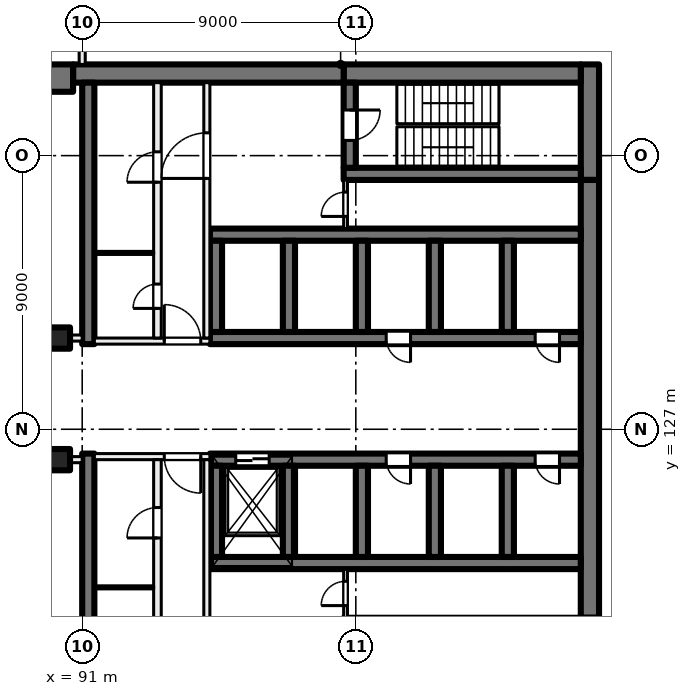
"""IFC4 building model, lengths in metres.
Left out: names, types, materials, properties, quantities, classifications, styles, units other than length and angle.
Written with IfcOpenShell. Run it as: python <this file> out.ifc"""

import sys

from ifc_helpers import new_model, si_unit, direction, frame, frame_2d, origin, origin_2d, place, context, subcontext, project, spatial, rectangle, extrude, element, fill, save


model = new_model("IFC4")
c1 = context("Model", 3, precision=1e-05, world=origin(), true_north=direction((0.0, 1.0)))
c2 = subcontext(c1, "Body", "Model", "MODEL_VIEW")
j1 = project(units=[si_unit("LENGTHUNIT", "METRE"), si_unit("PLANEANGLEUNIT", "RADIAN")], contexts=[c1])
p1 = place(None, origin())
s1 = spatial("IfcSite", under=j1, at=p1, CompositionType="ELEMENT")
p2 = place(p1, origin())
s2 = spatial("IfcBuilding", under=s1, at=p2, CompositionType="ELEMENT")
p3 = place(p2, frame((0.0, 0.0, -9.0)))
s3 = spatial("IfcBuildingStorey", under=s2, at=p3, CompositionType="ELEMENT", Elevation=-9.0)
for number, where, z_axis, x_axis in (
    (1, (90.25, 130.0, 0.0), (0.0, 0.0, 1.0), (1.0, 0.0, 0.0)),
    (2, (90.25, 126.0, 0.0), (0.0, 0.0, 1.0), (1.0, 0.0, 0.0)),
):
    element("IfcColumn", number, at=place(p3, frame(where, z_axis=z_axis, x_axis=x_axis)), inside=s3, PredefinedType="COLUMN", context=c2, shape_type="SweptSolid", body=[
        extrude(rectangle(XDim=0.7, YDim=0.7, at=origin_2d()), origin(), (0.0, 0.0, 1.0), 4.5),
    ])
p4 = place(p3, frame((90.25, 138.55, 0.0), z_axis=(0.0, 0.0, 1.0), x_axis=(1.0, 0.0, 0.0)))
e3 = element("IfcColumn", 3, at=p4, inside=s3, PredefinedType="COLUMN", context=c2, shape_type="SweptSolid", body=[
    extrude(rectangle(XDim=0.9, YDim=0.9, at=origin_2d()), origin(), (0.0, 0.0, 1.0), 4.5),
])
p5 = place(p3, frame((107.7, 139.0, 0.0), z_axis=(0.0, 0.0, 1.0), x_axis=(0.0, -1.0, 0.0)))
e4 = element("IfcWall", 4, at=p5, inside=s3, PredefinedType="SHEAR", context=c2, shape_type="SweptSolid", body=[
    extrude(rectangle(XDim=3.8, YDim=0.6, at=frame_2d((1.9, 0.0))), origin(), (0.0, 0.0, 1.0), 4.5),
])
p6 = place(p3, frame((107.7, 135.2, 0.0), z_axis=(0.0, 0.0, 1.0), x_axis=(0.0, -1.0, 0.0)))
e5 = element("IfcWall", 5, at=p6, inside=s3, PredefinedType="SHEAR", context=c2, shape_type="SweptSolid", body=[
    extrude(rectangle(XDim=14.4, YDim=0.6, at=frame_2d((7.2, 0.0))), origin(), (0.0, 0.0, 1.0), 4.5),
])
p7 = place(p3, frame((107.4, 138.7, 0.0), z_axis=(0.0, 0.0, 1.0), x_axis=(-1.0, 0.0, 0.0)))
e6 = element("IfcWall", 6, at=p7, inside=s3, PredefinedType="SHEAR", context=c2, shape_type="SweptSolid", body=[
    extrude(rectangle(XDim=7.8, YDim=0.6, at=frame_2d((3.9, 0.0))), origin(), (0.0, 0.0, 1.0), 4.5),
])
p8 = place(p3, frame((99.6, 138.7, 0.0), z_axis=(0.0, 0.0, 1.0), x_axis=(-1.0, 0.0, 0.0)))
e7 = element("IfcWall", 7, at=p8, inside=s3, PredefinedType="SHEAR", context=c2, shape_type="SweptSolid", body=[
    extrude(rectangle(XDim=8.9, YDim=0.6, at=frame_2d((4.45, 0.0))), origin(), (0.0, 0.0, 1.0), 4.5),
])
p9 = place(p3, frame((107.4, 135.4, 0.0), z_axis=(0.0, 0.0, 1.0), x_axis=(-1.0, 0.0, 0.0)))
e8 = element("IfcWall", 8, at=p9, inside=s3, PredefinedType="SHEAR", context=c2, shape_type="SweptSolid", body=[
    extrude(rectangle(XDim=7.8, YDim=0.4, at=frame_2d((3.9, 0.0))), origin(), (0.0, 0.0, 1.0), 4.5),
])
p10 = place(p3, frame((99.8, 138.4, 0.0), z_axis=(0.0, 0.0, 1.0), x_axis=(0.0, -1.0, 0.0)))
e9 = element("IfcWall", 9, at=p10, inside=s3, PredefinedType="SHEAR", context=c2, shape_type="SweptSolid", body=[
    extrude(rectangle(XDim=2.8, YDim=0.4, at=frame_2d((1.4, 0.0))), origin(), (0.0, 0.0, 1.0), 4.5),
])
p11 = place(p10, frame((0.9, 0.0, 0.0)))
e10 = element("IfcOpeningElement", 10, at=p11, cuts=e9, PredefinedType="OPENING", context=c2, shape_type="SweptSolid", body=[
    extrude(rectangle(XDim=1.0, YDim=2.1, at=frame_2d((0.5, 1.05))), frame((0.0, 0.21, 0.0), z_axis=(0.0, -1.0, 0.0), x_axis=(1.0, 0.0, 0.0)), (0.0, 0.0, 1.0), 0.42),
])
p12 = place(p3, frame((107.4, 130.0, 0.0), z_axis=(0.0, 0.0, 1.0), x_axis=(-1.0, 0.0, 0.0)))
e11 = element("IfcWall", 11, at=p12, inside=s3, PredefinedType="SHEAR", context=c2, shape_type="SweptSolid", body=[
    extrude(rectangle(XDim=12.2, YDim=0.4, at=frame_2d((6.1, 0.0))), origin(), (0.0, 0.0, 1.0), 4.5),
])
p13 = place(p12, frame((0.7, 0.0, 0.0)))
e12 = element("IfcOpeningElement", 12, at=p13, cuts=e11, PredefinedType="OPENING", context=c2, shape_type="SweptSolid", body=[
    extrude(rectangle(XDim=0.8, YDim=2.1, at=frame_2d((0.4, 1.05))), frame((0.0, 0.21, 0.0), z_axis=(0.0, -1.0, 0.0), x_axis=(1.0, 0.0, 0.0)), (0.0, 0.0, 1.0), 0.42),
])
p14 = place(p12, frame((5.6, 0.0, 0.0)))
e13 = element("IfcOpeningElement", 13, at=p14, cuts=e11, PredefinedType="OPENING", context=c2, shape_type="SweptSolid", body=[
    extrude(rectangle(XDim=0.8, YDim=2.1, at=frame_2d((0.4, 1.05))), frame((0.0, 0.21, 0.0), z_axis=(0.0, -1.0, 0.0), x_axis=(1.0, 0.0, 0.0)), (0.0, 0.0, 1.0), 0.42),
])
p15 = place(p3, frame((107.4, 133.4, 0.0), z_axis=(0.0, 0.0, 1.0), x_axis=(-1.0, 0.0, 0.0)))
e14 = element("IfcWall", 14, at=p15, inside=s3, PredefinedType="SHEAR", context=c2, shape_type="SweptSolid", body=[
    extrude(rectangle(XDim=12.2, YDim=0.4, at=frame_2d((6.1, 0.0))), origin(), (0.0, 0.0, 1.0), 4.5),
])
for number, where, z_axis, x_axis in (
    (15, (105.0, 133.2, 0.0), (0.0, 0.0, 1.0), (0.0, -1.0, 0.0)),
    (16, (102.6, 133.2, 0.0), (0.0, 0.0, 1.0), (0.0, -1.0, 0.0)),
    (17, (100.2, 133.2, 0.0), (0.0, 0.0, 1.0), (0.0, -1.0, 0.0)),
    (18, (97.8, 133.2, 0.0), (0.0, 0.0, 1.0), (0.0, -1.0, 0.0)),
    (19, (95.4, 133.2, 0.0), (0.0, 0.0, 1.0), (0.0, -1.0, 0.0)),
):
    element("IfcWall", number, at=place(p3, frame(where, z_axis=z_axis, x_axis=x_axis)), inside=s3, PredefinedType="SHEAR", context=c2, shape_type="SweptSolid", body=[
        extrude(rectangle(XDim=3.0, YDim=0.4, at=frame_2d((1.5, 0.0))), origin(), (0.0, 0.0, 1.0), 4.5),
    ])
p16 = place(p3, frame((107.4, 126.0, 0.0), z_axis=(0.0, 0.0, 1.0), x_axis=(-1.0, 0.0, 0.0)))
e20 = element("IfcWall", 20, at=p16, inside=s3, PredefinedType="SHEAR", context=c2, shape_type="SweptSolid", body=[
    extrude(rectangle(XDim=12.2, YDim=0.4, at=frame_2d((6.1, 0.0))), origin(), (0.0, 0.0, 1.0), 4.5),
])
p17 = place(p16, frame((10.25, 0.0, 0.0)))
e21 = element("IfcOpeningElement", 21, at=p17, cuts=e20, PredefinedType="OPENING", context=c2, shape_type="SweptSolid", body=[
    extrude(rectangle(XDim=1.1, YDim=2.1, at=frame_2d((0.55, 1.05))), frame((0.0, 0.21, 0.0), z_axis=(0.0, -1.0, 0.0), x_axis=(1.0, 0.0, 0.0)), (0.0, 0.0, 1.0), 0.42),
])
p18 = place(p16, frame((0.7, 0.0, 0.0)))
e22 = element("IfcOpeningElement", 22, at=p18, cuts=e20, PredefinedType="OPENING", context=c2, shape_type="SweptSolid", body=[
    extrude(rectangle(XDim=0.8, YDim=2.1, at=frame_2d((0.4, 1.05))), frame((0.0, 0.21, 0.0), z_axis=(0.0, -1.0, 0.0), x_axis=(1.0, 0.0, 0.0)), (0.0, 0.0, 1.0), 0.42),
])
p19 = place(p16, frame((5.6, 0.0, 0.0)))
e23 = element("IfcOpeningElement", 23, at=p19, cuts=e20, PredefinedType="OPENING", context=c2, shape_type="SweptSolid", body=[
    extrude(rectangle(XDim=0.8, YDim=2.1, at=frame_2d((0.4, 1.05))), frame((0.0, 0.21, 0.0), z_axis=(0.0, -1.0, 0.0), x_axis=(1.0, 0.0, 0.0)), (0.0, 0.0, 1.0), 0.42),
])
p20 = place(p3, frame((107.4, 122.6, 0.0), z_axis=(0.0, 0.0, 1.0), x_axis=(-1.0, 0.0, 0.0)))
e24 = element("IfcWall", 24, at=p20, inside=s3, PredefinedType="SHEAR", context=c2, shape_type="SweptSolid", body=[
    extrude(rectangle(XDim=12.2, YDim=0.4, at=frame_2d((6.1, 0.0))), origin(), (0.0, 0.0, 1.0), 4.5),
])
for number, where, z_axis, x_axis in (
    (25, (105.0, 125.8, 0.0), (0.0, 0.0, 1.0), (0.0, -1.0, 0.0)),
    (26, (102.6, 125.8, 0.0), (0.0, 0.0, 1.0), (0.0, -1.0, 0.0)),
    (27, (100.2, 125.8, 0.0), (0.0, 0.0, 1.0), (0.0, -1.0, 0.0)),
    (28, (97.8, 125.8, 0.0), (0.0, 0.0, 1.0), (0.0, -1.0, 0.0)),
    (29, (95.4, 125.8, 0.0), (0.0, 0.0, 1.0), (0.0, -1.0, 0.0)),
):
    element("IfcWall", number, at=place(p3, frame(where, z_axis=z_axis, x_axis=x_axis)), inside=s3, PredefinedType="SHEAR", context=c2, shape_type="SweptSolid", body=[
        extrude(rectangle(XDim=3.0, YDim=0.4, at=frame_2d((1.5, 0.0))), origin(), (0.0, 0.0, 1.0), 4.5),
    ])
for number, where, z_axis, x_axis in (
    (30, (91.2, 138.4, 0.0), (0.0, 0.0, 1.0), (0.0, -1.0, 0.0)),
    (31, (91.2, 126.2, 0.0), (0.0, 0.0, 1.0), (0.0, -1.0, 0.0)),
):
    element("IfcWall", number, at=place(p3, frame(where, z_axis=z_axis, x_axis=x_axis)), inside=s3, PredefinedType="SHEAR", context=c2, shape_type="SweptSolid", body=[
        extrude(rectangle(XDim=8.6, YDim=0.4, at=frame_2d((4.3, 0.0))), origin(), (0.0, 0.0, 1.0), 4.5),
    ])
p21 = place(p3, frame((95.2, 126.1, 0.0), z_axis=(0.0, 0.0, 1.0), x_axis=(-1.0, 0.0, 0.0)))
e32 = element("IfcWall", 32, at=p21, inside=s3, PredefinedType="PARTITIONING", context=c2, shape_type="SweptSolid", body=[
    extrude(rectangle(XDim=3.8, YDim=0.2, at=frame_2d((1.9, 0.0))), origin(), (0.0, 0.0, 1.0), 4.125),
])
p22 = place(p21, frame((0.3, 0.0, 0.0)))
e33 = element("IfcOpeningElement", 33, at=p22, cuts=e32, PredefinedType="OPENING", context=c2, shape_type="SweptSolid", body=[
    extrude(rectangle(XDim=1.2, YDim=2.1, at=frame_2d((0.6, 1.05))), frame((0.0, 0.11, 0.0), z_axis=(0.0, -1.0, 0.0), x_axis=(1.0, 0.0, 0.0)), (0.0, 0.0, 1.0), 0.22),
])
p23 = place(p3, frame((95.1, 117.6, 0.0), z_axis=(0.0, 0.0, 1.0), x_axis=(0.0, 1.0, 0.0)))
e34 = element("IfcWall", 34, at=p23, inside=s3, PredefinedType="PARTITIONING", context=c2, shape_type="SweptSolid", body=[
    extrude(rectangle(XDim=8.4, YDim=0.2, at=frame_2d((4.2, 0.0))), origin(), (0.0, 0.0, 1.0), 4.125),
])
p24 = place(p23, frame((1.65, 0.0, 0.0)))
e35 = element("IfcOpeningElement", 35, at=p24, cuts=e34, PredefinedType="OPENING", context=c2, shape_type="SweptSolid", body=[
    extrude(rectangle(XDim=1.5, YDim=2.1, at=frame_2d((0.75, 1.05))), frame((0.0, 0.11, 0.0), z_axis=(0.0, -1.0, 0.0), x_axis=(1.0, 0.0, 0.0)), (0.0, 0.0, 1.0), 0.22),
])
p25 = place(p3, frame((93.475, 117.6, 0.0), z_axis=(0.0, 0.0, 1.0), x_axis=(0.0, 1.0, 0.0)))
e36 = element("IfcWall", 36, at=p25, inside=s3, PredefinedType="PARTITIONING", context=c2, shape_type="SweptSolid", body=[
    extrude(rectangle(XDim=8.4, YDim=0.25, at=frame_2d((4.2, 0.0))), origin(), (0.0, 0.0, 1.0), 4.125),
])
p26 = place(p25, frame((5.825, 0.0, 0.0)))
e37 = element("IfcOpeningElement", 37, at=p26, cuts=e36, PredefinedType="OPENING", context=c2, shape_type="SweptSolid", body=[
    extrude(rectangle(XDim=1.0, YDim=2.1, at=frame_2d((0.5, 1.05))), frame((0.0, 0.135, 0.0), z_axis=(0.0, -1.0, 0.0), x_axis=(1.0, 0.0, 0.0)), (0.0, 0.0, 1.0), 0.27),
])
p27 = place(p25, frame((1.675, 0.0, 0.0)))
e38 = element("IfcOpeningElement", 38, at=p27, cuts=e36, PredefinedType="OPENING", context=c2, shape_type="SweptSolid", body=[
    extrude(rectangle(XDim=0.8, YDim=2.1, at=frame_2d((0.4, 1.05))), frame((0.0, 0.135, 0.0), z_axis=(0.0, -1.0, 0.0), x_axis=(1.0, 0.0, 0.0)), (0.0, 0.0, 1.0), 0.27),
])
p28 = place(p3, frame((99.663, 120.8, 0.0), z_axis=(0.0, 0.0, 1.0), x_axis=(0.0, 1.0, 0.0)))
e39 = element("IfcWall", 39, at=p28, inside=s3, PredefinedType="PARTITIONING", context=c2, shape_type="SweptSolid", body=[
    extrude(rectangle(XDim=1.6, YDim=0.125, at=frame_2d((0.8, 0.0))), origin(), (0.0, 0.0, 1.0), 4.125),
])
p29 = place(p28, frame((0.4, 0.0, 0.0)))
e40 = element("IfcOpeningElement", 40, at=p29, cuts=e39, PredefinedType="OPENING", context=c2, shape_type="SweptSolid", body=[
    extrude(rectangle(XDim=0.8, YDim=2.1, at=frame_2d((0.4, 1.05))), frame((0.0, 0.073, 0.0), z_axis=(0.0, -1.0, 0.0), x_axis=(1.0, 0.0, 0.0)), (0.0, 0.0, 1.0), 0.145),
])
p30 = place(p3, frame((93.35, 121.8, 0.0), z_axis=(0.0, 0.0, 1.0), x_axis=(-1.0, 0.0, 0.0)))
e41 = element("IfcWall", 41, at=p30, inside=s3, PredefinedType="PARTITIONING", context=c2, shape_type="SweptSolid", body=[
    extrude(rectangle(XDim=1.95, YDim=0.1, at=frame_2d((0.975, 0.0))), origin(), (0.0, 0.0, 1.0), 4.125),
])
p31 = place(p3, frame((91.4, 129.9, 0.0), z_axis=(0.0, 0.0, 1.0), x_axis=(1.0, 0.0, 0.0)))
e42 = element("IfcWall", 42, at=p31, inside=s3, PredefinedType="PARTITIONING", context=c2, shape_type="SweptSolid", body=[
    extrude(rectangle(XDim=3.8, YDim=0.2, at=frame_2d((1.9, 0.0))), origin(), (0.0, 0.0, 1.0), 4.125),
])
p32 = place(p31, frame((2.3, 0.0, 0.0)))
e43 = element("IfcOpeningElement", 43, at=p32, cuts=e42, PredefinedType="OPENING", context=c2, shape_type="SweptSolid", body=[
    extrude(rectangle(XDim=1.2, YDim=2.1, at=frame_2d((0.6, 1.05))), frame((0.0, 0.11, 0.0), z_axis=(0.0, -1.0, 0.0), x_axis=(1.0, 0.0, 0.0)), (0.0, 0.0, 1.0), 0.22),
])
p33 = place(p3, frame((95.1, 130.0, 0.0), z_axis=(0.0, 0.0, 1.0), x_axis=(0.0, 1.0, 0.0)))
e44 = element("IfcWall", 44, at=p33, inside=s3, PredefinedType="PARTITIONING", context=c2, shape_type="SweptSolid", body=[
    extrude(rectangle(XDim=8.4, YDim=0.2, at=frame_2d((4.2, 0.0))), origin(), (0.0, 0.0, 1.0), 4.125),
])
p34 = place(p33, frame((5.25, 0.0, 0.0)))
e45 = element("IfcOpeningElement", 45, at=p34, cuts=e44, PredefinedType="OPENING", context=c2, shape_type="SweptSolid", body=[
    extrude(rectangle(XDim=1.5, YDim=2.1, at=frame_2d((0.75, 1.05))), frame((0.0, 0.11, 0.0), z_axis=(0.0, -1.0, 0.0), x_axis=(1.0, 0.0, 0.0)), (0.0, 0.0, 1.0), 0.22),
])
p35 = place(p3, frame((93.475, 130.0, 0.0), z_axis=(0.0, 0.0, 1.0), x_axis=(0.0, 1.0, 0.0)))
e46 = element("IfcWall", 46, at=p35, inside=s3, PredefinedType="PARTITIONING", context=c2, shape_type="SweptSolid", body=[
    extrude(rectangle(XDim=8.4, YDim=0.25, at=frame_2d((4.2, 0.0))), origin(), (0.0, 0.0, 1.0), 4.125),
])
p36 = place(p35, frame((0.975, 0.0, 0.0)))
e47 = element("IfcOpeningElement", 47, at=p36, cuts=e46, PredefinedType="OPENING", context=c2, shape_type="SweptSolid", body=[
    extrude(rectangle(XDim=0.8, YDim=2.1, at=frame_2d((0.4, 1.05))), frame((0.0, 0.135, 0.0), z_axis=(0.0, -1.0, 0.0), x_axis=(1.0, 0.0, 0.0)), (0.0, 0.0, 1.0), 0.27),
])
p37 = place(p35, frame((5.125, 0.0, 0.0)))
e48 = element("IfcOpeningElement", 48, at=p37, cuts=e46, PredefinedType="OPENING", context=c2, shape_type="SweptSolid", body=[
    extrude(rectangle(XDim=1.0, YDim=2.1, at=frame_2d((0.5, 1.05))), frame((0.0, 0.135, 0.0), z_axis=(0.0, -1.0, 0.0), x_axis=(1.0, 0.0, 0.0)), (0.0, 0.0, 1.0), 0.27),
])
p38 = place(p3, frame((99.663, 133.6, 0.0), z_axis=(0.0, 0.0, 1.0), x_axis=(0.0, 1.0, 0.0)))
e49 = element("IfcWall", 49, at=p38, inside=s3, PredefinedType="PARTITIONING", context=c2, shape_type="SweptSolid", body=[
    extrude(rectangle(XDim=1.6, YDim=0.125, at=frame_2d((0.8, 0.0))), origin(), (0.0, 0.0, 1.0), 4.125),
])
p39 = place(p38, frame((0.4, 0.0, 0.0)))
e50 = element("IfcOpeningElement", 50, at=p39, cuts=e49, PredefinedType="OPENING", context=c2, shape_type="SweptSolid", body=[
    extrude(rectangle(XDim=0.8, YDim=2.1, at=frame_2d((0.4, 1.05))), frame((0.0, 0.073, 0.0), z_axis=(0.0, -1.0, 0.0), x_axis=(1.0, 0.0, 0.0)), (0.0, 0.0, 1.0), 0.145),
])
p40 = place(p3, frame((91.4, 132.8, 0.0), z_axis=(0.0, 0.0, 1.0), x_axis=(1.0, 0.0, 0.0)))
e51 = element("IfcWall", 51, at=p40, inside=s3, PredefinedType="PARTITIONING", context=c2, shape_type="SweptSolid", body=[
    extrude(rectangle(XDim=1.95, YDim=0.1, at=frame_2d((0.975, 0.0))), origin(), (0.0, 0.0, 1.0), 4.125),
])
p41 = place(p3, frame((72.4, 130.0, 0.0), z_axis=(0.0, 0.0, 1.0), x_axis=(1.0, 0.0, 0.0)))
e52 = element("IfcWall", 52, at=p41, inside=s3, PredefinedType="PARTITIONING", context=c2, shape_type="SweptSolid", body=[
    extrude(rectangle(XDim=18.6, YDim=0.2, at=frame_2d((9.3, 0.0))), origin(), (0.0, 0.0, 1.0), 4.125),
])
p42 = place(p41, frame((9.298, 0.0, 0.0)))
e53 = element("IfcOpeningElement", 53, at=p42, cuts=e52, PredefinedType="OPENING", context=c2, shape_type="SweptSolid", body=[
    extrude(rectangle(XDim=1.0, YDim=2.1, at=frame_2d((0.5, 1.05))), frame((0.0, 0.11, 0.0), z_axis=(0.0, -1.0, 0.0), x_axis=(1.0, 0.0, 0.0)), (0.0, 0.0, 1.0), 0.22),
])
p43 = place(p3, frame((91.0, 126.0, 0.0), z_axis=(0.0, 0.0, 1.0), x_axis=(-1.0, 0.0, 0.0)))
e54 = element("IfcWall", 54, at=p43, inside=s3, PredefinedType="PARTITIONING", context=c2, shape_type="SweptSolid", body=[
    extrude(rectangle(XDim=18.0, YDim=0.2, at=frame_2d((9.0, 0.0))), origin(), (0.0, 0.0, 1.0), 4.125),
])
p44 = place(p43, frame((8.302, 0.0, 0.0)))
e55 = element("IfcOpeningElement", 55, at=p44, cuts=e54, PredefinedType="OPENING", context=c2, shape_type="SweptSolid", body=[
    extrude(rectangle(XDim=1.0, YDim=2.1, at=frame_2d((0.5, 1.05))), frame((0.0, 0.11, 0.0), z_axis=(0.0, -1.0, 0.0), x_axis=(1.0, 0.0, 0.0)), (0.0, 0.0, 1.0), 0.22),
])
p45 = place(p3, frame((91.0, 139.0, 0.0), z_axis=(0.0, 0.0, 1.0), x_axis=(0.0, 1.0, 0.0)))
e56 = element("IfcWall", 56, at=p45, inside=s3, PredefinedType="PARTITIONING", context=c2, shape_type="SweptSolid", body=[
    extrude(rectangle(XDim=7.35, YDim=0.2, at=frame_2d((3.675, 0.0))), origin(), (0.0, 0.0, 1.0), 4.125),
])
p46 = place(p17, origin())
e57 = element("IfcDoor", 57, at=p46, inside=s3, OperationType="DOUBLE_DOOR_SLIDING", PredefinedType="DOOR", context=c2, shape_type="SweptSolid", body=[
    extrude(rectangle(XDim=1.1, YDim=2.1, at=frame_2d((0.55, 1.05))), frame((0.0, 0.025, 0.0), z_axis=(0.0, -1.0, 0.0), x_axis=(1.0, 0.0, 0.0)), (0.0, 0.0, 1.0), 0.05),
])
fill(e21, e57)
p47 = place(p18, origin())
e58 = element("IfcDoor", 58, at=p47, inside=s3, OperationType="SINGLE_SWING_LEFT", PredefinedType="DOOR", context=c2, shape_type="SweptSolid", body=[
    extrude(rectangle(XDim=0.8, YDim=2.1, at=frame_2d((0.4, 1.05))), frame((0.0, 0.025, 0.0), z_axis=(0.0, -1.0, 0.0), x_axis=(1.0, 0.0, 0.0)), (0.0, 0.0, 1.0), 0.05),
])
fill(e22, e58)
p48 = place(p19, origin())
e59 = element("IfcDoor", 59, at=p48, inside=s3, OperationType="SINGLE_SWING_RIGHT", PredefinedType="DOOR", context=c2, shape_type="SweptSolid", body=[
    extrude(rectangle(XDim=0.8, YDim=2.1, at=frame_2d((0.4, 1.05))), frame((0.0, 0.025, 0.0), z_axis=(0.0, -1.0, 0.0), x_axis=(1.0, 0.0, 0.0)), (0.0, 0.0, 1.0), 0.05),
])
fill(e23, e59)
p49 = place(p13, origin())
e60 = element("IfcDoor", 60, at=p49, inside=s3, OperationType="SINGLE_SWING_LEFT", PredefinedType="DOOR", context=c2, shape_type="SweptSolid", body=[
    extrude(rectangle(XDim=0.8, YDim=2.1, at=frame_2d((0.4, 1.05))), frame((0.0, 0.025, 0.0), z_axis=(0.0, -1.0, 0.0), x_axis=(1.0, 0.0, 0.0)), (0.0, 0.0, 1.0), 0.05),
])
fill(e12, e60)
p50 = place(p14, origin())
e61 = element("IfcDoor", 61, at=p50, inside=s3, OperationType="SINGLE_SWING_RIGHT", PredefinedType="DOOR", context=c2, shape_type="SweptSolid", body=[
    extrude(rectangle(XDim=0.8, YDim=2.1, at=frame_2d((0.4, 1.05))), frame((0.0, 0.025, 0.0), z_axis=(0.0, -1.0, 0.0), x_axis=(1.0, 0.0, 0.0)), (0.0, 0.0, 1.0), 0.05),
])
fill(e13, e61)
p51 = place(p22, origin())
e62 = element("IfcDoor", 62, at=p51, inside=s3, OperationType="DOUBLE_DOOR_SINGLE_SWING", PredefinedType="DOOR", context=c2, shape_type="SweptSolid", body=[
    extrude(rectangle(XDim=1.2, YDim=2.1, at=frame_2d((0.6, 1.05))), frame((0.0, 0.025, 0.0), z_axis=(0.0, -1.0, 0.0), x_axis=(1.0, 0.0, 0.0)), (0.0, 0.0, 1.0), 0.05),
])
fill(e33, e62)
p52 = place(p29, origin())
e63 = element("IfcDoor", 63, at=p52, inside=s3, OperationType="SINGLE_SWING_RIGHT", PredefinedType="DOOR", context=c2, shape_type="SweptSolid", body=[
    extrude(rectangle(XDim=0.8, YDim=2.1, at=frame_2d((0.4, 1.05))), frame((0.0, 0.025, 0.0), z_axis=(0.0, -1.0, 0.0), x_axis=(1.0, 0.0, 0.0)), (0.0, 0.0, 1.0), 0.05),
])
fill(e40, e63)
p53 = place(p26, origin())
e64 = element("IfcDoor", 64, at=p53, inside=s3, OperationType="SINGLE_SWING_LEFT", PredefinedType="DOOR", context=c2, shape_type="SweptSolid", body=[
    extrude(rectangle(XDim=1.0, YDim=2.1, at=frame_2d((0.5, 1.05))), frame((0.0, 0.025, 0.0), z_axis=(0.0, -1.0, 0.0), x_axis=(1.0, 0.0, 0.0)), (0.0, 0.0, 1.0), 0.05),
])
fill(e37, e64)
p54 = place(p32, origin())
e65 = element("IfcDoor", 65, at=p54, inside=s3, OperationType="DOUBLE_DOOR_SINGLE_SWING", PredefinedType="DOOR", context=c2, shape_type="SweptSolid", body=[
    extrude(rectangle(XDim=1.2, YDim=2.1, at=frame_2d((0.6, 1.05))), frame((0.0, 0.025, 0.0), z_axis=(0.0, -1.0, 0.0), x_axis=(1.0, 0.0, 0.0)), (0.0, 0.0, 1.0), 0.05),
])
fill(e43, e65)
p55 = place(p34, origin())
e66 = element("IfcDoor", 66, at=p55, inside=s3, OperationType="DOUBLE_DOOR_SINGLE_SWING", PredefinedType="DOOR", context=c2, shape_type="SweptSolid", body=[
    extrude(rectangle(XDim=1.5, YDim=2.1, at=frame_2d((0.75, 1.05))), frame((0.0, 0.025, 0.0), z_axis=(0.0, -1.0, 0.0), x_axis=(1.0, 0.0, 0.0)), (0.0, 0.0, 1.0), 0.05),
])
fill(e45, e66)
p56 = place(p11, origin())
e67 = element("IfcDoor", 67, at=p56, inside=s3, OperationType="SINGLE_SWING_RIGHT", PredefinedType="DOOR", context=c2, shape_type="SweptSolid", body=[
    extrude(rectangle(XDim=1.0, YDim=2.1, at=frame_2d((0.5, 1.05))), frame((0.0, 0.025, 0.0), z_axis=(0.0, -1.0, 0.0), x_axis=(1.0, 0.0, 0.0)), (0.0, 0.0, 1.0), 0.05),
])
fill(e10, e67)
p57 = place(p39, origin())
e68 = element("IfcDoor", 68, at=p57, inside=s3, OperationType="SINGLE_SWING_LEFT", PredefinedType="DOOR", context=c2, shape_type="SweptSolid", body=[
    extrude(rectangle(XDim=0.8, YDim=2.1, at=frame_2d((0.4, 1.05))), frame((0.0, 0.025, 0.0), z_axis=(0.0, -1.0, 0.0), x_axis=(1.0, 0.0, 0.0)), (0.0, 0.0, 1.0), 0.05),
])
fill(e50, e68)
p58 = place(p36, origin())
e69 = element("IfcDoor", 69, at=p58, inside=s3, OperationType="SINGLE_SWING_RIGHT", PredefinedType="DOOR", context=c2, shape_type="SweptSolid", body=[
    extrude(rectangle(XDim=0.8, YDim=2.1, at=frame_2d((0.4, 1.05))), frame((0.0, 0.025, 0.0), z_axis=(0.0, -1.0, 0.0), x_axis=(1.0, 0.0, 0.0)), (0.0, 0.0, 1.0), 0.05),
])
fill(e47, e69)
p59 = place(p37, origin())
e70 = element("IfcDoor", 70, at=p59, inside=s3, OperationType="SINGLE_SWING_LEFT", PredefinedType="DOOR", context=c2, shape_type="SweptSolid", body=[
    extrude(rectangle(XDim=1.0, YDim=2.1, at=frame_2d((0.5, 1.05))), frame((0.0, 0.025, 0.0), z_axis=(0.0, -1.0, 0.0), x_axis=(1.0, 0.0, 0.0)), (0.0, 0.0, 1.0), 0.05),
])
fill(e48, e70)
save(model, sys.argv[1])
